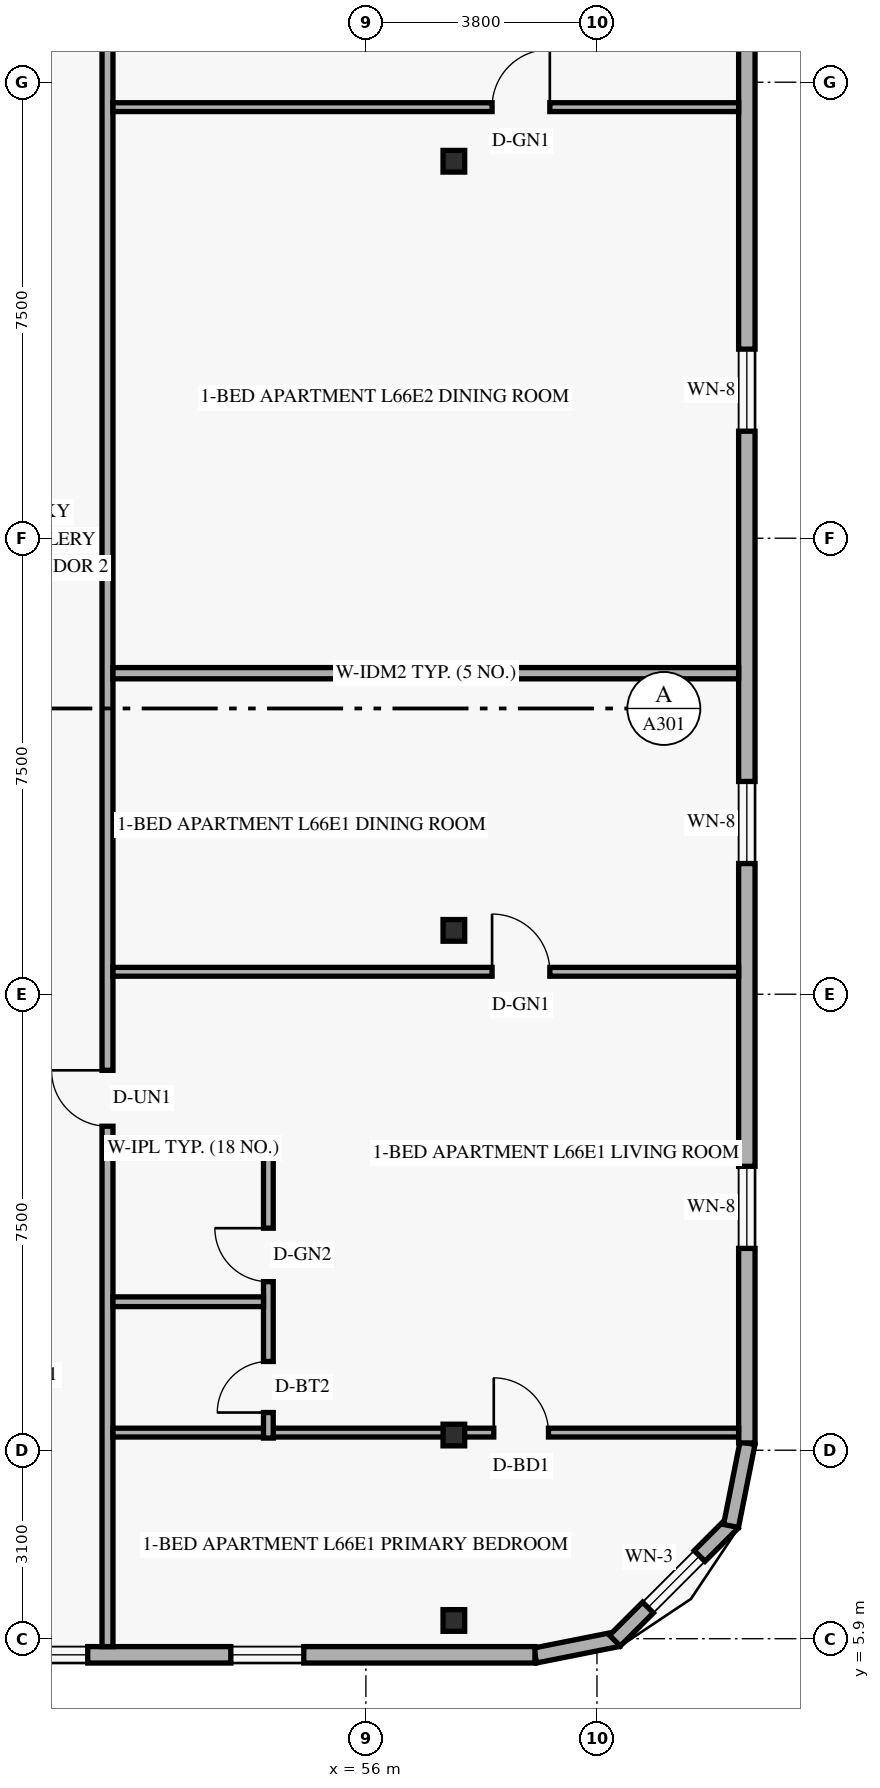
"""IFC4 building model, lengths in metres.
Left out: names, types, materials, properties, quantities, classifications, styles, units other than length and angle.
Written with IfcOpenShell. Run it as: python <this file> out.ifc"""

import sys

from ifc_helpers import new_model, si_unit, direction, frame, frame_2d, origin, origin_2d, place, context, subcontext, project, spatial, rectangle, hollow_rectangle, extrude, element, fill, save


model = new_model("IFC4")
c1 = context("Model", 3, precision=1e-05, world=origin(), true_north=direction((0.0, 1.0)))
c2 = subcontext(c1, "Body", "Model", "MODEL_VIEW")
j1 = project(units=[si_unit("LENGTHUNIT", "METRE"), si_unit("PLANEANGLEUNIT", "RADIAN")], contexts=[c1])
p1 = place(None, origin())
s1 = spatial("IfcSite", under=j1, at=p1, CompositionType="ELEMENT")
p2 = place(p1, origin())
s2 = spatial("IfcBuilding", under=s1, at=p2, CompositionType="ELEMENT")
p3 = place(p2, frame((0.0, 0.0, 253.2)))
s3 = spatial("IfcBuildingStorey", under=s2, at=p3, CompositionType="ELEMENT", Elevation=253.2)
for number, where, z_axis, x_axis in (
    (1, (57.342, 6.2, 0.0), (0.058, 0.0, 0.998), (0.0, 1.0, 0.0)),
    (2, (57.342, 9.25, 0.0), (0.058, 0.0, 0.998), (0.0, 1.0, 0.0)),
    (3, (57.342, 17.55, 0.0), (0.058, 0.0, 0.998), (0.0, 1.0, 0.0)),
    (4, (57.342, 30.2, 0.0), (0.058, 0.0, 0.998), (0.0, 1.0, 0.0)),
):
    element("IfcColumn", number, at=place(p3, frame(where, z_axis=z_axis, x_axis=x_axis)), inside=s3, PredefinedType="COLUMN", context=c2, shape_type="SweptSolid", body=[
        extrude(hollow_rectangle(XDim=0.356, YDim=0.356, WallThickness=0.016, at=origin_2d()), origin(), (0.0, 0.0, 1.0), 3.606),
    ])
p4 = place(p3, frame((58.783, 5.624, 0.0), z_axis=(0.0, 0.0, 1.0), x_axis=(0.980809899341, 0.19496651342, 0.0)))
e5 = element("IfcWall", 5, at=p4, inside=s3, PredefinedType="SOLIDWALL", context=c2, shape_type="SweptSolid", body=[
    extrude(rectangle(XDim=1.389, YDim=0.25, at=frame_2d((0.694, 0.0))), origin(), (0.0, 0.0, 1.0), 3.36),
])
p5 = place(p3, frame((60.095, 5.868, 0.0), z_axis=(0.0, 0.0, 1.0), x_axis=(0.707106781187, 0.707106781187, 0.0)))
e6 = element("IfcWall", 6, at=p5, inside=s3, PredefinedType="SOLIDWALL", context=c2, shape_type="SweptSolid", body=[
    extrude(rectangle(XDim=2.739, YDim=0.25, at=frame_2d((1.37, 0.0))), origin(), (0.0, 0.0, 1.0), 3.36),
])
p6 = place(p5, frame((0.77, 0.0, 0.85)))
e7 = element("IfcOpeningElement", 7, at=p6, cuts=e6, PredefinedType="OPENING", context=c2, shape_type="SweptSolid", body=[
    extrude(rectangle(XDim=1.2, YDim=1.5, at=frame_2d((0.6, 0.75))), frame((0.0, 0.135, 0.0), z_axis=(0.0, -1.0, 0.0), x_axis=(1.0, 0.0, 0.0)), (0.0, 0.0, 1.0), 0.27),
])
p7 = place(p3, frame((62.005, 7.754, 0.0), z_axis=(0.0, 0.0, 1.0), x_axis=(0.195135625965, 0.9807762678, 0.0)))
e8 = element("IfcWall", 8, at=p7, inside=s3, PredefinedType="SOLIDWALL", context=c2, shape_type="SweptSolid", body=[
    extrude(rectangle(XDim=1.389, YDim=0.25, at=frame_2d((0.694, 0.0))), origin(), (0.0, 0.0, 1.0), 3.36),
])
p8 = place(p3, frame((25.82, 5.635, 0.0), z_axis=(0.0, 0.0, 1.0), x_axis=(1.0, 0.0, 0.0)))
e9 = element("IfcWall", 9, at=p8, inside=s3, PredefinedType="SOLIDWALL", context=c2, shape_type="SweptSolid", body=[
    extrude(rectangle(XDim=32.96, YDim=0.27, at=frame_2d((16.48, 0.0))), origin(), (0.0, 0.0, 1.0), 3.36),
])
p9 = place(p8, frame((3.87, 0.0, 0.85)))
e10 = element("IfcOpeningElement", 10, at=p9, cuts=e9, PredefinedType="OPENING", context=c2, shape_type="SweptSolid", body=[
    extrude(rectangle(XDim=1.2, YDim=1.5, at=frame_2d((0.6, 0.75))), frame((0.0, 0.145, 0.0), z_axis=(0.0, -1.0, 0.0), x_axis=(1.0, 0.0, 0.0)), (0.0, 0.0, 1.0), 0.29),
])
p10 = place(p8, frame((19.753, 0.0, 0.85)))
e11 = element("IfcOpeningElement", 11, at=p10, cuts=e9, PredefinedType="OPENING", context=c2, shape_type="SweptSolid", body=[
    extrude(rectangle(XDim=1.2, YDim=1.5, at=frame_2d((0.6, 0.75))), frame((0.0, 0.145, 0.0), z_axis=(0.0, -1.0, 0.0), x_axis=(1.0, 0.0, 0.0)), (0.0, 0.0, 1.0), 0.29),
])
p11 = place(p8, frame((24.405, 0.0, 0.85)))
e12 = element("IfcOpeningElement", 12, at=p11, cuts=e9, PredefinedType="OPENING", context=c2, shape_type="SweptSolid", body=[
    extrude(rectangle(XDim=1.2, YDim=1.5, at=frame_2d((0.6, 0.75))), frame((0.0, 0.145, 0.0), z_axis=(0.0, -1.0, 0.0), x_axis=(1.0, 0.0, 0.0)), (0.0, 0.0, 1.0), 0.29),
])
p12 = place(p8, frame((27.958, 0.0, 0.85)))
e13 = element("IfcOpeningElement", 13, at=p12, cuts=e9, PredefinedType="OPENING", context=c2, shape_type="SweptSolid", body=[
    extrude(rectangle(XDim=1.2, YDim=1.5, at=frame_2d((0.6, 0.75))), frame((0.0, 0.145, 0.0), z_axis=(0.0, -1.0, 0.0), x_axis=(1.0, 0.0, 0.0)), (0.0, 0.0, 1.0), 0.29),
])
p13 = place(p3, frame((62.265, 9.12, 0.0), z_axis=(0.0, 0.0, 1.0), x_axis=(0.0, 1.0, 0.0)))
e14 = element("IfcWall", 14, at=p13, inside=s3, PredefinedType="SOLIDWALL", context=c2, shape_type="SweptSolid", body=[
    extrude(rectangle(XDim=29.76, YDim=0.27, at=frame_2d((14.88, 0.0))), origin(), (0.0, 0.0, 1.0), 3.36),
])
p14 = place(p13, frame((3.199, 0.0, 0.85)))
e15 = element("IfcOpeningElement", 15, at=p14, cuts=e14, PredefinedType="OPENING", context=c2, shape_type="SweptSolid", body=[
    extrude(rectangle(XDim=1.35, YDim=1.55, at=frame_2d((0.675, 0.775))), frame((0.0, 0.145, 0.0), z_axis=(0.0, -1.0, 0.0), x_axis=(1.0, 0.0, 0.0)), (0.0, 0.0, 1.0), 0.29),
])
p15 = place(p13, frame((9.529, 0.0, 0.85)))
e16 = element("IfcOpeningElement", 16, at=p15, cuts=e14, PredefinedType="OPENING", context=c2, shape_type="SweptSolid", body=[
    extrude(rectangle(XDim=1.35, YDim=1.55, at=frame_2d((0.675, 0.775))), frame((0.0, 0.145, 0.0), z_axis=(0.0, -1.0, 0.0), x_axis=(1.0, 0.0, 0.0)), (0.0, 0.0, 1.0), 0.29),
])
p16 = place(p13, frame((16.64, 0.0, 0.85)))
e17 = element("IfcOpeningElement", 17, at=p16, cuts=e14, PredefinedType="OPENING", context=c2, shape_type="SweptSolid", body=[
    extrude(rectangle(XDim=1.35, YDim=1.55, at=frame_2d((0.675, 0.775))), frame((0.0, 0.145, 0.0), z_axis=(0.0, -1.0, 0.0), x_axis=(1.0, 0.0, 0.0)), (0.0, 0.0, 1.0), 0.29),
])
p17 = place(p13, frame((25.19, 0.0, 0.85)))
e18 = element("IfcOpeningElement", 18, at=p17, cuts=e14, PredefinedType="OPENING", context=c2, shape_type="SweptSolid", body=[
    extrude(rectangle(XDim=1.35, YDim=1.55, at=frame_2d((0.675, 0.775))), frame((0.0, 0.145, 0.0), z_axis=(0.0, -1.0, 0.0), x_axis=(1.0, 0.0, 0.0)), (0.0, 0.0, 1.0), 0.29),
])
p18 = place(p3, frame((51.75, 5.77, 0.0), z_axis=(0.0, 0.0, 1.0), x_axis=(0.0, 1.0, 0.0)))
e19 = element("IfcWall", 19, at=p18, inside=s3, PredefinedType="STANDARD", context=c2, shape_type="SweptSolid", body=[
    extrude(rectangle(XDim=36.46, YDim=0.18, at=frame_2d((18.23, 0.0))), origin(), (0.0, 0.0, 1.0), 2.803),
])
p19 = place(p18, frame((8.559, 0.0, 0.0)))
e20 = element("IfcOpeningElement", 20, at=p19, cuts=e19, PredefinedType="OPENING", context=c2, shape_type="SweptSolid", body=[
    extrude(rectangle(XDim=0.92, YDim=2.15, at=frame_2d((0.46, 1.075))), frame((0.0, 0.1, 0.0), z_axis=(0.0, -1.0, 0.0), x_axis=(1.0, 0.0, 0.0)), (0.0, 0.0, 1.0), 0.2),
])
p20 = place(p18, frame((26.933, 0.0, 0.0)))
e21 = element("IfcOpeningElement", 21, at=p20, cuts=e19, PredefinedType="OPENING", context=c2, shape_type="SweptSolid", body=[
    extrude(rectangle(XDim=0.92, YDim=2.15, at=frame_2d((0.46, 1.075))), frame((0.0, 0.1, 0.0), z_axis=(0.0, -1.0, 0.0), x_axis=(1.0, 0.0, 0.0)), (0.0, 0.0, 1.0), 0.2),
])
p21 = place(p3, frame((51.84, 9.29, 0.0), z_axis=(0.0, 0.0, 1.0), x_axis=(1.0, 0.0, 0.0)))
e22 = element("IfcWall", 22, at=p21, inside=s3, PredefinedType="PARTITIONING", context=c2, shape_type="SweptSolid", body=[
    extrude(rectangle(XDim=10.29, YDim=0.145, at=frame_2d((5.145, 0.0))), origin(), (0.0, 0.0, 1.0), 2.803),
])
p22 = place(p21, frame((6.263, 0.0, 0.0)))
e23 = element("IfcOpeningElement", 23, at=p22, cuts=e22, PredefinedType="OPENING", context=c2, shape_type="SweptSolid", body=[
    extrude(rectangle(XDim=0.9, YDim=2.14, at=frame_2d((0.45, 1.07))), frame((0.0, 0.083, 0.0), z_axis=(0.0, -1.0, 0.0), x_axis=(1.0, 0.0, 0.0)), (0.0, 0.0, 1.0), 0.165),
])
p23 = place(p3, frame((51.84, 13.969, 0.0), z_axis=(0.0, 0.0, 1.0), x_axis=(1.0, 0.0, 0.0)))
e24 = element("IfcWall", 24, at=p23, inside=s3, PredefinedType="PLUMBINGWALL", context=c2, shape_type="SweptSolid", body=[
    extrude(rectangle(XDim=2.636, YDim=0.16, at=frame_2d((1.318, 0.0))), origin(), (0.0, 0.0, 1.0), 3.36),
])
p24 = place(p3, frame((54.396, 9.2, 0.0), z_axis=(0.0, 0.0, 1.0), x_axis=(0.0, 1.0, 0.0)))
e25 = element("IfcWall", 25, at=p24, inside=s3, PredefinedType="PLUMBINGWALL", context=c2, shape_type="SweptSolid", body=[
    extrude(rectangle(XDim=4.859, YDim=0.16, at=frame_2d((2.429, 0.0))), origin(), (0.0, 0.0, 1.0), 2.803),
])
p25 = place(p24, frame((0.42, 0.0, 0.0)))
e26 = element("IfcOpeningElement", 26, at=p25, cuts=e25, PredefinedType="OPENING", context=c2, shape_type="SweptSolid", body=[
    extrude(rectangle(XDim=0.84, YDim=2.12, at=frame_2d((0.42, 1.06))), frame((0.0, 0.09, 0.0), z_axis=(0.0, -1.0, 0.0), x_axis=(1.0, 0.0, 0.0)), (0.0, 0.0, 1.0), 0.18),
])
p26 = place(p24, frame((2.572, 0.0, 0.0)))
e27 = element("IfcOpeningElement", 27, at=p26, cuts=e25, PredefinedType="OPENING", context=c2, shape_type="SweptSolid", body=[
    extrude(rectangle(XDim=0.88, YDim=2.12, at=frame_2d((0.44, 1.06))), frame((0.0, 0.09, 0.0), z_axis=(0.0, -1.0, 0.0), x_axis=(1.0, 0.0, 0.0)), (0.0, 0.0, 1.0), 0.18),
])
p27 = place(p3, frame((51.84, 11.442, 0.0), z_axis=(0.0, 0.0, 1.0), x_axis=(1.0, 0.0, 0.0)))
e28 = element("IfcWall", 28, at=p27, inside=s3, PredefinedType="PLUMBINGWALL", context=c2, shape_type="SweptSolid", body=[
    extrude(rectangle(XDim=2.476, YDim=0.16, at=frame_2d((1.238, 0.0))), origin(), (0.0, 0.0, 1.0), 3.36),
])
p28 = place(p3, frame((51.84, 16.869, 0.0), z_axis=(0.0, 0.0, 1.0), x_axis=(1.0, 0.0, 0.0)))
e29 = element("IfcWall", 29, at=p28, inside=s3, PredefinedType="PARTITIONING", context=c2, shape_type="SweptSolid", body=[
    extrude(rectangle(XDim=10.29, YDim=0.145, at=frame_2d((5.145, 0.0))), origin(), (0.0, 0.0, 1.0), 2.879),
])
p29 = place(p28, frame((6.235, 0.0, 0.0)))
e30 = element("IfcOpeningElement", 30, at=p29, cuts=e29, PredefinedType="OPENING", context=c2, shape_type="SweptSolid", body=[
    extrude(rectangle(XDim=0.95, YDim=2.15, at=frame_2d((0.475, 1.075))), frame((0.0, 0.083, 0.0), z_axis=(0.0, -1.0, 0.0), x_axis=(1.0, 0.0, 0.0)), (0.0, 0.0, 1.0), 0.165),
])
p30 = place(p3, frame((51.84, 21.78, 0.0), z_axis=(0.0, 0.0, 1.0), x_axis=(1.0, 0.0, 0.0)))
e31 = element("IfcWall", 31, at=p30, inside=s3, PredefinedType="PARTITIONING", context=c2, shape_type="SweptSolid", body=[
    extrude(rectangle(XDim=10.29, YDim=0.185, at=frame_2d((5.145, 0.0))), origin(), (0.0, 0.0, 1.0), 2.879),
])
p31 = place(p3, frame((51.84, 31.09, 0.0), z_axis=(0.0, 0.0, 1.0), x_axis=(1.0, 0.0, 0.0)))
e32 = element("IfcWall", 32, at=p31, inside=s3, PredefinedType="PARTITIONING", context=c2, shape_type="SweptSolid", body=[
    extrude(rectangle(XDim=10.29, YDim=0.145, at=frame_2d((5.145, 0.0))), origin(), (0.0, 0.0, 1.0), 2.879),
])
p32 = place(p31, frame((6.235, 0.0, 0.0)))
e33 = element("IfcOpeningElement", 33, at=p32, cuts=e32, PredefinedType="OPENING", context=c2, shape_type="SweptSolid", body=[
    extrude(rectangle(XDim=0.95, YDim=2.15, at=frame_2d((0.475, 1.075))), frame((0.0, 0.083, 0.0), z_axis=(0.0, -1.0, 0.0), x_axis=(1.0, 0.0, 0.0)), (0.0, 0.0, 1.0), 0.165),
])
p33 = place(p6, origin())
e34 = element("IfcWindow", 34, at=p33, inside=s3, PartitioningType="SINGLE_PANEL", PredefinedType="WINDOW", context=c2, shape_type="SweptSolid", body=[
    extrude(rectangle(XDim=1.2, YDim=1.5, at=frame_2d((0.6, 0.75))), frame((0.0, 0.03, 0.0), z_axis=(0.0, -1.0, 0.0), x_axis=(1.0, 0.0, 0.0)), (0.0, 0.0, 1.0), 0.06),
])
fill(e7, e34)
p34 = place(p11, origin())
e35 = element("IfcWindow", 35, at=p34, inside=s3, PartitioningType="SINGLE_PANEL", PredefinedType="WINDOW", context=c2, shape_type="SweptSolid", body=[
    extrude(rectangle(XDim=1.2, YDim=1.5, at=frame_2d((0.6, 0.75))), frame((0.0, 0.03, 0.0), z_axis=(0.0, -1.0, 0.0), x_axis=(1.0, 0.0, 0.0)), (0.0, 0.0, 1.0), 0.06),
])
fill(e12, e35)
p35 = place(p12, origin())
e36 = element("IfcWindow", 36, at=p35, inside=s3, PartitioningType="SINGLE_PANEL", PredefinedType="WINDOW", context=c2, shape_type="SweptSolid", body=[
    extrude(rectangle(XDim=1.2, YDim=1.5, at=frame_2d((0.6, 0.75))), frame((0.0, 0.03, 0.0), z_axis=(0.0, -1.0, 0.0), x_axis=(1.0, 0.0, 0.0)), (0.0, 0.0, 1.0), 0.06),
])
fill(e13, e36)
p36 = place(p14, origin())
e37 = element("IfcWindow", 37, at=p36, inside=s3, PartitioningType="SINGLE_PANEL", PredefinedType="WINDOW", context=c2, shape_type="SweptSolid", body=[
    extrude(rectangle(XDim=1.35, YDim=1.55, at=frame_2d((0.675, 0.775))), frame((0.0, 0.03, 0.0), z_axis=(0.0, -1.0, 0.0), x_axis=(1.0, 0.0, 0.0)), (0.0, 0.0, 1.0), 0.06),
])
fill(e15, e37)
p37 = place(p15, origin())
e38 = element("IfcWindow", 38, at=p37, inside=s3, PartitioningType="SINGLE_PANEL", PredefinedType="WINDOW", context=c2, shape_type="SweptSolid", body=[
    extrude(rectangle(XDim=1.35, YDim=1.55, at=frame_2d((0.675, 0.775))), frame((0.0, 0.03, 0.0), z_axis=(0.0, -1.0, 0.0), x_axis=(1.0, 0.0, 0.0)), (0.0, 0.0, 1.0), 0.06),
])
fill(e16, e38)
p38 = place(p16, origin())
e39 = element("IfcWindow", 39, at=p38, inside=s3, PartitioningType="SINGLE_PANEL", PredefinedType="WINDOW", context=c2, shape_type="SweptSolid", body=[
    extrude(rectangle(XDim=1.35, YDim=1.55, at=frame_2d((0.675, 0.775))), frame((0.0, 0.03, 0.0), z_axis=(0.0, -1.0, 0.0), x_axis=(1.0, 0.0, 0.0)), (0.0, 0.0, 1.0), 0.06),
])
fill(e17, e39)
p39 = place(p29, origin())
e40 = element("IfcDoor", 40, at=p39, inside=s3, OperationType="SINGLE_SWING_LEFT", PredefinedType="DOOR", context=c2, shape_type="SweptSolid", body=[
    extrude(rectangle(XDim=0.95, YDim=2.15, at=frame_2d((0.475, 1.075))), frame((0.0, 0.025, 0.0), z_axis=(0.0, -1.0, 0.0), x_axis=(1.0, 0.0, 0.0)), (0.0, 0.0, 1.0), 0.05),
])
fill(e30, e40)
p40 = place(p19, origin())
e41 = element("IfcDoor", 41, at=p40, inside=s3, OperationType="SINGLE_SWING_RIGHT", PredefinedType="DOOR", context=c2, shape_type="SweptSolid", body=[
    extrude(rectangle(XDim=0.92, YDim=2.15, at=frame_2d((0.46, 1.075))), frame((0.0, 0.025, 0.0), z_axis=(0.0, -1.0, 0.0), x_axis=(1.0, 0.0, 0.0)), (0.0, 0.0, 1.0), 0.05),
])
fill(e20, e41)
p41 = place(p25, origin())
e42 = element("IfcDoor", 42, at=p41, inside=s3, OperationType="SINGLE_SWING_LEFT", PredefinedType="DOOR", context=c2, shape_type="SweptSolid", body=[
    extrude(rectangle(XDim=0.84, YDim=2.12, at=frame_2d((0.42, 1.06))), frame((0.0, 0.025, 0.0), z_axis=(0.0, -1.0, 0.0), x_axis=(1.0, 0.0, 0.0)), (0.0, 0.0, 1.0), 0.05),
])
fill(e26, e42)
p42 = place(p26, origin())
e43 = element("IfcDoor", 43, at=p42, inside=s3, OperationType="SINGLE_SWING_RIGHT", PredefinedType="DOOR", context=c2, shape_type="SweptSolid", body=[
    extrude(rectangle(XDim=0.88, YDim=2.12, at=frame_2d((0.44, 1.06))), frame((0.0, 0.025, 0.0), z_axis=(0.0, -1.0, 0.0), x_axis=(1.0, 0.0, 0.0)), (0.0, 0.0, 1.0), 0.05),
])
fill(e27, e43)
p43 = place(p22, origin())
e44 = element("IfcDoor", 44, at=p43, inside=s3, OperationType="SINGLE_SWING_LEFT", PredefinedType="DOOR", context=c2, shape_type="SweptSolid", body=[
    extrude(rectangle(XDim=0.9, YDim=2.14, at=frame_2d((0.45, 1.07))), frame((0.0, 0.025, 0.0), z_axis=(0.0, -1.0, 0.0), x_axis=(1.0, 0.0, 0.0)), (0.0, 0.0, 1.0), 0.05),
])
fill(e23, e44)
p44 = place(p32, origin())
e45 = element("IfcDoor", 45, at=p44, inside=s3, OperationType="SINGLE_SWING_RIGHT", PredefinedType="DOOR", context=c2, shape_type="SweptSolid", body=[
    extrude(rectangle(XDim=0.95, YDim=2.15, at=frame_2d((0.475, 1.075))), frame((0.0, 0.025, 0.0), z_axis=(0.0, -1.0, 0.0), x_axis=(1.0, 0.0, 0.0)), (0.0, 0.0, 1.0), 0.05),
])
fill(e33, e45)
save(model, sys.argv[1])
